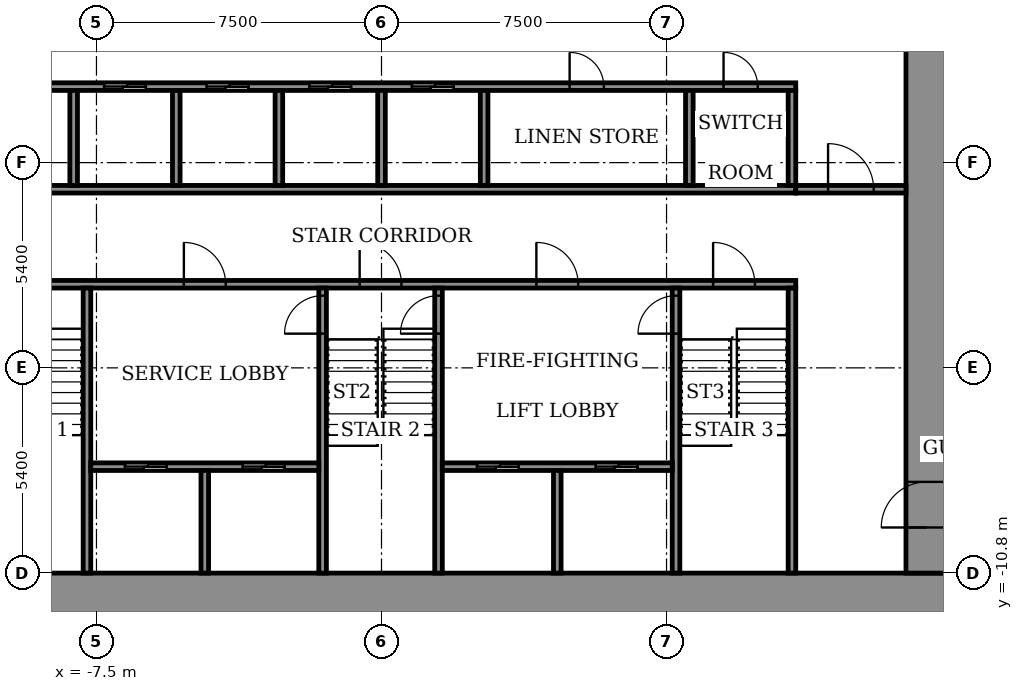
"""IFC4 building model, lengths in metres.
Left out: names, types, materials, properties, quantities, classifications, styles, units other than length and angle.
Written with IfcOpenShell. Run it as: python <this file> out.ifc"""

import sys

from ifc_helpers import new_model, si_unit, direction, frame, frame_2d, origin, place, context, subcontext, project, spatial, rectangle, extrude, element, fill, save


model = new_model("IFC4")
c1 = context("Model", 3, precision=1e-05, world=origin(), true_north=direction((0.0, 1.0)))
c2 = subcontext(c1, "Body", "Model", "MODEL_VIEW")
j1 = project(units=[si_unit("LENGTHUNIT", "METRE"), si_unit("PLANEANGLEUNIT", "RADIAN")], contexts=[c1])
p1 = place(None, origin())
s1 = spatial("IfcSite", under=j1, at=p1, CompositionType="ELEMENT")
p2 = place(p1, origin())
s2 = spatial("IfcBuilding", under=s1, at=p2, CompositionType="ELEMENT")
p3 = place(p2, frame((0.0, 0.0, 67.5)))
s3 = spatial("IfcBuildingStorey", under=s2, at=p3, CompositionType="ELEMENT", Elevation=67.5)
p4 = place(p3, frame((-14.9, -11.35, 0.0), z_axis=(0.0, 0.0, 1.0), x_axis=(1.0, 0.0, 0.0)))
e1 = element("IfcWall", 1, at=p4, inside=s3, PredefinedType="SHEAR", context=c2, shape_type="SweptSolid", body=[
    extrude(rectangle(XDim=29.8, YDim=1.1, at=frame_2d((14.9, 0.0))), origin(), (0.0, 0.0, 1.0), 3.6),
])
p5 = place(p3, frame((14.35, -10.8, 0.0), z_axis=(0.0, 0.0, 1.0), x_axis=(0.0, 1.0, 0.0)))
e2 = element("IfcWall", 2, at=p5, inside=s3, PredefinedType="SHEAR", context=c2, shape_type="SweptSolid", body=[
    extrude(rectangle(XDim=21.6, YDim=1.1, at=frame_2d((10.8, 0.0))), origin(), (0.0, 0.0, 1.0), 3.6),
])
p6 = place(p5, frame((1.2, 0.0, 0.0)))
e3 = element("IfcOpeningElement", 3, at=p6, cuts=e2, PredefinedType="OPENING", context=c2, shape_type="SweptSolid", body=[
    extrude(rectangle(XDim=1.2, YDim=2.1, at=frame_2d((0.6, 1.05))), frame((0.0, 0.56, 0.0), z_axis=(0.0, -1.0, 0.0), x_axis=(1.0, 0.0, 0.0)), (0.0, 0.0, 1.0), 1.12),
])
p7 = place(p3, frame((-10.9, -3.2, 0.0), z_axis=(0.0, 0.0, 1.0), x_axis=(1.0, 0.0, 0.0)))
e4 = element("IfcWall", 4, at=p7, inside=s3, PredefinedType="SHEAR", context=c2, shape_type="SweptSolid", body=[
    extrude(rectangle(XDim=21.8, YDim=0.2, at=frame_2d((10.9, 0.0))), origin(), (0.0, 0.0, 1.0), 3.05),
])
p8 = place(p7, frame((1.075, 0.0, 0.0)))
e5 = element("IfcOpeningElement", 5, at=p8, cuts=e4, PredefinedType="OPENING", context=c2, shape_type="SweptSolid", body=[
    extrude(rectangle(XDim=1.1, YDim=2.1, at=frame_2d((0.55, 1.05))), frame((0.0, 0.11, 0.0), z_axis=(0.0, -1.0, 0.0), x_axis=(1.0, 0.0, 0.0)), (0.0, 0.0, 1.0), 0.22),
])
p9 = place(p7, frame((10.325, 0.0, 0.0)))
e6 = element("IfcOpeningElement", 6, at=p9, cuts=e4, PredefinedType="OPENING", context=c2, shape_type="SweptSolid", body=[
    extrude(rectangle(XDim=1.1, YDim=2.1, at=frame_2d((0.55, 1.05))), frame((0.0, 0.11, 0.0), z_axis=(0.0, -1.0, 0.0), x_axis=(1.0, 0.0, 0.0)), (0.0, 0.0, 1.0), 0.22),
])
p10 = place(p7, frame((19.625, 0.0, 0.0)))
e7 = element("IfcOpeningElement", 7, at=p10, cuts=e4, PredefinedType="OPENING", context=c2, shape_type="SweptSolid", body=[
    extrude(rectangle(XDim=1.1, YDim=2.1, at=frame_2d((0.55, 1.05))), frame((0.0, 0.11, 0.0), z_axis=(0.0, -1.0, 0.0), x_axis=(1.0, 0.0, 0.0)), (0.0, 0.0, 1.0), 0.22),
])
p11 = place(p7, frame((5.7, 0.0, 0.0)))
e8 = element("IfcOpeningElement", 8, at=p11, cuts=e4, PredefinedType="OPENING", context=c2, shape_type="SweptSolid", body=[
    extrude(rectangle(XDim=1.1, YDim=2.1, at=frame_2d((0.55, 1.05))), frame((0.0, 0.11, 0.0), z_axis=(0.0, -1.0, 0.0), x_axis=(1.0, 0.0, 0.0)), (0.0, 0.0, 1.0), 0.22),
])
p12 = place(p7, frame((14.975, 0.0, 0.0)))
e9 = element("IfcOpeningElement", 9, at=p12, cuts=e4, PredefinedType="OPENING", context=c2, shape_type="SweptSolid", body=[
    extrude(rectangle(XDim=1.1, YDim=2.1, at=frame_2d((0.55, 1.05))), frame((0.0, 0.11, 0.0), z_axis=(0.0, -1.0, 0.0), x_axis=(1.0, 0.0, 0.0)), (0.0, 0.0, 1.0), 0.22),
])
p13 = place(p3, frame((-10.9, -0.7, 0.0), z_axis=(0.0, 0.0, 1.0), x_axis=(1.0, 0.0, 0.0)))
e10 = element("IfcWall", 10, at=p13, inside=s3, PredefinedType="SHEAR", context=c2, shape_type="SweptSolid", body=[
    extrude(rectangle(XDim=21.8, YDim=0.2, at=frame_2d((10.9, 0.0))), origin(), (0.0, 0.0, 1.0), 3.05),
])
p14 = place(p3, frame((-10.9, 2.0, 0.0), z_axis=(0.0, 0.0, 1.0), x_axis=(1.0, 0.0, 0.0)))
e11 = element("IfcWall", 11, at=p14, inside=s3, PredefinedType="SHEAR", context=c2, shape_type="SweptSolid", body=[
    extrude(rectangle(XDim=21.8, YDim=0.2, at=frame_2d((10.9, 0.0))), origin(), (0.0, 0.0, 1.0), 3.05),
])
p15 = place(p14, frame((0.9, 0.0, 0.0)))
e12 = element("IfcOpeningElement", 12, at=p15, cuts=e11, PredefinedType="OPENING", context=c2, shape_type="SweptSolid", body=[
    extrude(rectangle(XDim=1.1, YDim=2.1, at=frame_2d((0.55, 1.05))), frame((0.0, 0.11, 0.0), z_axis=(0.0, -1.0, 0.0), x_axis=(1.0, 0.0, 0.0)), (0.0, 0.0, 1.0), 0.22),
])
p16 = place(p14, frame((3.6, 0.0, 0.0)))
e13 = element("IfcOpeningElement", 13, at=p16, cuts=e11, PredefinedType="OPENING", context=c2, shape_type="SweptSolid", body=[
    extrude(rectangle(XDim=1.1, YDim=2.1, at=frame_2d((0.55, 1.05))), frame((0.0, 0.11, 0.0), z_axis=(0.0, -1.0, 0.0), x_axis=(1.0, 0.0, 0.0)), (0.0, 0.0, 1.0), 0.22),
])
p17 = place(p14, frame((6.3, 0.0, 0.0)))
e14 = element("IfcOpeningElement", 14, at=p17, cuts=e11, PredefinedType="OPENING", context=c2, shape_type="SweptSolid", body=[
    extrude(rectangle(XDim=1.1, YDim=2.1, at=frame_2d((0.55, 1.05))), frame((0.0, 0.11, 0.0), z_axis=(0.0, -1.0, 0.0), x_axis=(1.0, 0.0, 0.0)), (0.0, 0.0, 1.0), 0.22),
])
p18 = place(p14, frame((9.0, 0.0, 0.0)))
e15 = element("IfcOpeningElement", 15, at=p18, cuts=e11, PredefinedType="OPENING", context=c2, shape_type="SweptSolid", body=[
    extrude(rectangle(XDim=1.1, YDim=2.1, at=frame_2d((0.55, 1.05))), frame((0.0, 0.11, 0.0), z_axis=(0.0, -1.0, 0.0), x_axis=(1.0, 0.0, 0.0)), (0.0, 0.0, 1.0), 0.22),
])
p19 = place(p14, frame((11.7, 0.0, 0.0)))
e16 = element("IfcOpeningElement", 16, at=p19, cuts=e11, PredefinedType="OPENING", context=c2, shape_type="SweptSolid", body=[
    extrude(rectangle(XDim=1.1, YDim=2.1, at=frame_2d((0.55, 1.05))), frame((0.0, 0.11, 0.0), z_axis=(0.0, -1.0, 0.0), x_axis=(1.0, 0.0, 0.0)), (0.0, 0.0, 1.0), 0.22),
])
p20 = place(p14, frame((15.85, 0.0, 0.0)))
e17 = element("IfcOpeningElement", 17, at=p20, cuts=e11, PredefinedType="OPENING", context=c2, shape_type="SweptSolid", body=[
    extrude(rectangle(XDim=0.9, YDim=2.1, at=frame_2d((0.45, 1.05))), frame((0.0, 0.11, 0.0), z_axis=(0.0, -1.0, 0.0), x_axis=(1.0, 0.0, 0.0)), (0.0, 0.0, 1.0), 0.22),
])
p21 = place(p14, frame((19.9, 0.0, 0.0)))
e18 = element("IfcOpeningElement", 18, at=p21, cuts=e11, PredefinedType="OPENING", context=c2, shape_type="SweptSolid", body=[
    extrude(rectangle(XDim=0.9, YDim=2.1, at=frame_2d((0.45, 1.05))), frame((0.0, 0.11, 0.0), z_axis=(0.0, -1.0, 0.0), x_axis=(1.0, 0.0, 0.0)), (0.0, 0.0, 1.0), 0.22),
])
p22 = place(p3, frame((-7.75, -10.8, 0.0), z_axis=(0.0, 0.0, 1.0), x_axis=(0.0, 1.0, 0.0)))
e19 = element("IfcWall", 19, at=p22, inside=s3, PredefinedType="SHEAR", context=c2, shape_type="SweptSolid", body=[
    extrude(rectangle(XDim=7.5, YDim=0.2, at=frame_2d((3.75, 0.0))), origin(), (0.0, 0.0, 1.0), 3.05),
])
p23 = place(p3, frame((-1.55, -10.8, 0.0), z_axis=(0.0, 0.0, 1.0), x_axis=(0.0, 1.0, 0.0)))
e20 = element("IfcWall", 20, at=p23, inside=s3, PredefinedType="SHEAR", context=c2, shape_type="SweptSolid", body=[
    extrude(rectangle(XDim=7.5, YDim=0.2, at=frame_2d((3.75, 0.0))), origin(), (0.0, 0.0, 1.0), 3.05),
])
p24 = place(p23, frame((6.3, 0.0, 0.0)))
e21 = element("IfcOpeningElement", 21, at=p24, cuts=e20, PredefinedType="OPENING", context=c2, shape_type="SweptSolid", body=[
    extrude(rectangle(XDim=1.0, YDim=2.1, at=frame_2d((0.5, 1.05))), frame((0.0, 0.11, 0.0), z_axis=(0.0, -1.0, 0.0), x_axis=(1.0, 0.0, 0.0)), (0.0, 0.0, 1.0), 0.22),
])
p25 = place(p3, frame((1.5, -10.8, 0.0), z_axis=(0.0, 0.0, 1.0), x_axis=(0.0, 1.0, 0.0)))
e22 = element("IfcWall", 22, at=p25, inside=s3, PredefinedType="SHEAR", context=c2, shape_type="SweptSolid", body=[
    extrude(rectangle(XDim=7.5, YDim=0.2, at=frame_2d((3.75, 0.0))), origin(), (0.0, 0.0, 1.0), 3.05),
])
p26 = place(p25, frame((6.3, 0.0, 0.0)))
e23 = element("IfcOpeningElement", 23, at=p26, cuts=e22, PredefinedType="OPENING", context=c2, shape_type="SweptSolid", body=[
    extrude(rectangle(XDim=1.0, YDim=2.1, at=frame_2d((0.5, 1.05))), frame((0.0, 0.11, 0.0), z_axis=(0.0, -1.0, 0.0), x_axis=(1.0, 0.0, 0.0)), (0.0, 0.0, 1.0), 0.22),
])
p27 = place(p3, frame((7.75, -10.8, 0.0), z_axis=(0.0, 0.0, 1.0), x_axis=(0.0, 1.0, 0.0)))
e24 = element("IfcWall", 24, at=p27, inside=s3, PredefinedType="SHEAR", context=c2, shape_type="SweptSolid", body=[
    extrude(rectangle(XDim=7.5, YDim=0.2, at=frame_2d((3.75, 0.0))), origin(), (0.0, 0.0, 1.0), 3.05),
])
p28 = place(p27, frame((6.3, 0.0, 0.0)))
e25 = element("IfcOpeningElement", 25, at=p28, cuts=e24, PredefinedType="OPENING", context=c2, shape_type="SweptSolid", body=[
    extrude(rectangle(XDim=1.0, YDim=2.1, at=frame_2d((0.5, 1.05))), frame((0.0, 0.11, 0.0), z_axis=(0.0, -1.0, 0.0), x_axis=(1.0, 0.0, 0.0)), (0.0, 0.0, 1.0), 0.22),
])
p29 = place(p3, frame((10.8, -10.8, 0.0), z_axis=(0.0, 0.0, 1.0), x_axis=(0.0, 1.0, 0.0)))
e26 = element("IfcWall", 26, at=p29, inside=s3, PredefinedType="SHEAR", context=c2, shape_type="SweptSolid", body=[
    extrude(rectangle(XDim=7.5, YDim=0.2, at=frame_2d((3.75, 0.0))), origin(), (0.0, 0.0, 1.0), 3.05),
])
p30 = place(p3, frame((-7.65, -8.0, 0.0), z_axis=(0.0, 0.0, 1.0), x_axis=(1.0, 0.0, 0.0)))
e27 = element("IfcWall", 27, at=p30, inside=s3, PredefinedType="SHEAR", context=c2, shape_type="SweptSolid", body=[
    extrude(rectangle(XDim=6.0, YDim=0.2, at=frame_2d((3.0, 0.0))), origin(), (0.0, 0.0, 1.0), 3.05),
])
p31 = place(p30, frame((0.9, 0.0, 0.0)))
e28 = element("IfcOpeningElement", 28, at=p31, cuts=e27, PredefinedType="OPENING", context=c2, shape_type="SweptSolid", body=[
    extrude(rectangle(XDim=1.1, YDim=2.1, at=frame_2d((0.55, 1.05))), frame((0.0, 0.11, 0.0), z_axis=(0.0, -1.0, 0.0), x_axis=(1.0, 0.0, 0.0)), (0.0, 0.0, 1.0), 0.22),
])
p32 = place(p30, frame((4.0, 0.0, 0.0)))
e29 = element("IfcOpeningElement", 29, at=p32, cuts=e27, PredefinedType="OPENING", context=c2, shape_type="SweptSolid", body=[
    extrude(rectangle(XDim=1.1, YDim=2.1, at=frame_2d((0.55, 1.05))), frame((0.0, 0.11, 0.0), z_axis=(0.0, -1.0, 0.0), x_axis=(1.0, 0.0, 0.0)), (0.0, 0.0, 1.0), 0.22),
])
p33 = place(p3, frame((-4.65, -10.8, 0.0), z_axis=(0.0, 0.0, 1.0), x_axis=(0.0, 1.0, 0.0)))
e30 = element("IfcWall", 30, at=p33, inside=s3, PredefinedType="SHEAR", context=c2, shape_type="SweptSolid", body=[
    extrude(rectangle(XDim=2.7, YDim=0.2, at=frame_2d((1.35, 0.0))), origin(), (0.0, 0.0, 1.0), 3.05),
])
p34 = place(p3, frame((1.6, -8.0, 0.0), z_axis=(0.0, 0.0, 1.0), x_axis=(1.0, 0.0, 0.0)))
e31 = element("IfcWall", 31, at=p34, inside=s3, PredefinedType="SHEAR", context=c2, shape_type="SweptSolid", body=[
    extrude(rectangle(XDim=6.05, YDim=0.2, at=frame_2d((3.025, 0.0))), origin(), (0.0, 0.0, 1.0), 3.05),
])
p35 = place(p34, frame((0.913, 0.0, 0.0)))
e32 = element("IfcOpeningElement", 32, at=p35, cuts=e31, PredefinedType="OPENING", context=c2, shape_type="SweptSolid", body=[
    extrude(rectangle(XDim=1.1, YDim=2.1, at=frame_2d((0.55, 1.05))), frame((0.0, 0.11, 0.0), z_axis=(0.0, -1.0, 0.0), x_axis=(1.0, 0.0, 0.0)), (0.0, 0.0, 1.0), 0.22),
])
p36 = place(p34, frame((4.038, 0.0, 0.0)))
e33 = element("IfcOpeningElement", 33, at=p36, cuts=e31, PredefinedType="OPENING", context=c2, shape_type="SweptSolid", body=[
    extrude(rectangle(XDim=1.1, YDim=2.1, at=frame_2d((0.55, 1.05))), frame((0.0, 0.11, 0.0), z_axis=(0.0, -1.0, 0.0), x_axis=(1.0, 0.0, 0.0)), (0.0, 0.0, 1.0), 0.22),
])
p37 = place(p3, frame((4.625, -10.8, 0.0), z_axis=(0.0, 0.0, 1.0), x_axis=(0.0, 1.0, 0.0)))
e34 = element("IfcWall", 34, at=p37, inside=s3, PredefinedType="SHEAR", context=c2, shape_type="SweptSolid", body=[
    extrude(rectangle(XDim=2.7, YDim=0.2, at=frame_2d((1.35, 0.0))), origin(), (0.0, 0.0, 1.0), 3.05),
])
for number, where, z_axis, x_axis in (
    (35, (-8.1, -0.6, 0.0), (0.0, 0.0, 1.0), (0.0, 1.0, 0.0)),
    (36, (-5.4, -0.6, 0.0), (0.0, 0.0, 1.0), (0.0, 1.0, 0.0)),
    (37, (-2.7, -0.6, 0.0), (0.0, 0.0, 1.0), (0.0, 1.0, 0.0)),
    (38, (0.0, -0.6, 0.0), (0.0, 0.0, 1.0), (0.0, 1.0, 0.0)),
    (39, (2.7, -0.6, 0.0), (0.0, 0.0, 1.0), (0.0, 1.0, 0.0)),
):
    element("IfcWall", number, at=place(p3, frame(where, z_axis=z_axis, x_axis=x_axis)), inside=s3, PredefinedType="SHEAR", context=c2, shape_type="SweptSolid", body=[
        extrude(rectangle(XDim=2.5, YDim=0.2, at=frame_2d((1.25, 0.0))), origin(), (0.0, 0.0, 1.0), 3.05),
    ])
for number, where, z_axis, x_axis in (
    (40, (8.1, -0.6, 0.0), (0.0, 0.0, 1.0), (0.0, 1.0, 0.0)),
    (41, (10.8, -0.6, 0.0), (0.0, 0.0, 1.0), (0.0, 1.0, 0.0)),
):
    element("IfcWall", number, at=place(p3, frame(where, z_axis=z_axis, x_axis=x_axis)), inside=s3, PredefinedType="STANDARD", context=c2, shape_type="SweptSolid", body=[
        extrude(rectangle(XDim=2.5, YDim=0.2, at=frame_2d((1.25, 0.0))), origin(), (0.0, 0.0, 1.0), 3.05),
    ])
p38 = place(p3, frame((10.9, -0.7, 0.0), z_axis=(0.0, 0.0, 1.0), x_axis=(1.0, 0.0, 0.0)))
e42 = element("IfcWall", 42, at=p38, inside=s3, PredefinedType="STANDARD", context=c2, shape_type="SweptSolid", body=[
    extrude(rectangle(XDim=2.9, YDim=0.2, at=frame_2d((1.45, 0.0))), origin(), (0.0, 0.0, 1.0), 3.05),
])
p39 = place(p38, frame((0.85, 0.0, 0.0)))
e43 = element("IfcOpeningElement", 43, at=p39, cuts=e42, PredefinedType="OPENING", context=c2, shape_type="SweptSolid", body=[
    extrude(rectangle(XDim=1.2, YDim=2.1, at=frame_2d((0.6, 1.05))), frame((0.0, 0.11, 0.0), z_axis=(0.0, -1.0, 0.0), x_axis=(1.0, 0.0, 0.0)), (0.0, 0.0, 1.0), 0.22),
])
p40 = place(p6, origin())
e44 = element("IfcDoor", 44, at=p40, inside=s3, OperationType="DOUBLE_DOOR_SINGLE_SWING", PredefinedType="DOOR", context=c2, shape_type="SweptSolid", body=[
    extrude(rectangle(XDim=1.2, YDim=2.1, at=frame_2d((0.6, 1.05))), frame((0.0, 0.025, 0.0), z_axis=(0.0, -1.0, 0.0), x_axis=(1.0, 0.0, 0.0)), (0.0, 0.0, 1.0), 0.05),
])
fill(e3, e44)
p41 = place(p16, origin())
e45 = element("IfcDoor", 45, at=p41, inside=s3, OperationType="SLIDING_TO_LEFT", PredefinedType="DOOR", context=c2, shape_type="SweptSolid", body=[
    extrude(rectangle(XDim=1.1, YDim=2.1, at=frame_2d((0.55, 1.05))), frame((0.0, 0.025, 0.0), z_axis=(0.0, -1.0, 0.0), x_axis=(1.0, 0.0, 0.0)), (0.0, 0.0, 1.0), 0.05),
])
fill(e13, e45)
p42 = place(p17, origin())
e46 = element("IfcDoor", 46, at=p42, inside=s3, OperationType="SLIDING_TO_LEFT", PredefinedType="DOOR", context=c2, shape_type="SweptSolid", body=[
    extrude(rectangle(XDim=1.1, YDim=2.1, at=frame_2d((0.55, 1.05))), frame((0.0, 0.025, 0.0), z_axis=(0.0, -1.0, 0.0), x_axis=(1.0, 0.0, 0.0)), (0.0, 0.0, 1.0), 0.05),
])
fill(e14, e46)
p43 = place(p18, origin())
e47 = element("IfcDoor", 47, at=p43, inside=s3, OperationType="SLIDING_TO_LEFT", PredefinedType="DOOR", context=c2, shape_type="SweptSolid", body=[
    extrude(rectangle(XDim=1.1, YDim=2.1, at=frame_2d((0.55, 1.05))), frame((0.0, 0.025, 0.0), z_axis=(0.0, -1.0, 0.0), x_axis=(1.0, 0.0, 0.0)), (0.0, 0.0, 1.0), 0.05),
])
fill(e15, e47)
p44 = place(p19, origin())
e48 = element("IfcDoor", 48, at=p44, inside=s3, OperationType="SLIDING_TO_LEFT", PredefinedType="DOOR", context=c2, shape_type="SweptSolid", body=[
    extrude(rectangle(XDim=1.1, YDim=2.1, at=frame_2d((0.55, 1.05))), frame((0.0, 0.025, 0.0), z_axis=(0.0, -1.0, 0.0), x_axis=(1.0, 0.0, 0.0)), (0.0, 0.0, 1.0), 0.05),
])
fill(e16, e48)
p45 = place(p20, origin())
e49 = element("IfcDoor", 49, at=p45, inside=s3, OperationType="SINGLE_SWING_RIGHT", PredefinedType="DOOR", context=c2, shape_type="SweptSolid", body=[
    extrude(rectangle(XDim=0.9, YDim=2.1, at=frame_2d((0.45, 1.05))), frame((0.0, 0.025, 0.0), z_axis=(0.0, -1.0, 0.0), x_axis=(1.0, 0.0, 0.0)), (0.0, 0.0, 1.0), 0.05),
])
fill(e17, e49)
p46 = place(p21, origin())
e50 = element("IfcDoor", 50, at=p46, inside=s3, OperationType="SINGLE_SWING_LEFT", PredefinedType="DOOR", context=c2, shape_type="SweptSolid", body=[
    extrude(rectangle(XDim=0.9, YDim=2.1, at=frame_2d((0.45, 1.05))), frame((0.0, 0.025, 0.0), z_axis=(0.0, -1.0, 0.0), x_axis=(1.0, 0.0, 0.0)), (0.0, 0.0, 1.0), 0.05),
])
fill(e18, e50)
p47 = place(p35, origin())
e51 = element("IfcDoor", 51, at=p47, inside=s3, OperationType="SLIDING_TO_LEFT", PredefinedType="DOOR", context=c2, shape_type="SweptSolid", body=[
    extrude(rectangle(XDim=1.1, YDim=2.1, at=frame_2d((0.55, 1.05))), frame((0.0, 0.025, 0.0), z_axis=(0.0, -1.0, 0.0), x_axis=(1.0, 0.0, 0.0)), (0.0, 0.0, 1.0), 0.05),
])
fill(e32, e51)
p48 = place(p31, origin())
e52 = element("IfcDoor", 52, at=p48, inside=s3, OperationType="SLIDING_TO_LEFT", PredefinedType="DOOR", context=c2, shape_type="SweptSolid", body=[
    extrude(rectangle(XDim=1.1, YDim=2.1, at=frame_2d((0.55, 1.05))), frame((0.0, 0.025, 0.0), z_axis=(0.0, -1.0, 0.0), x_axis=(1.0, 0.0, 0.0)), (0.0, 0.0, 1.0), 0.05),
])
fill(e28, e52)
p49 = place(p36, origin())
e53 = element("IfcDoor", 53, at=p49, inside=s3, OperationType="SLIDING_TO_LEFT", PredefinedType="DOOR", context=c2, shape_type="SweptSolid", body=[
    extrude(rectangle(XDim=1.1, YDim=2.1, at=frame_2d((0.55, 1.05))), frame((0.0, 0.025, 0.0), z_axis=(0.0, -1.0, 0.0), x_axis=(1.0, 0.0, 0.0)), (0.0, 0.0, 1.0), 0.05),
])
fill(e33, e53)
p50 = place(p32, origin())
e54 = element("IfcDoor", 54, at=p50, inside=s3, OperationType="SLIDING_TO_LEFT", PredefinedType="DOOR", context=c2, shape_type="SweptSolid", body=[
    extrude(rectangle(XDim=1.1, YDim=2.1, at=frame_2d((0.55, 1.05))), frame((0.0, 0.025, 0.0), z_axis=(0.0, -1.0, 0.0), x_axis=(1.0, 0.0, 0.0)), (0.0, 0.0, 1.0), 0.05),
])
fill(e29, e54)
p51 = place(p9, origin())
e55 = element("IfcDoor", 55, at=p51, inside=s3, OperationType="SINGLE_SWING_RIGHT", PredefinedType="DOOR", context=c2, shape_type="SweptSolid", body=[
    extrude(rectangle(XDim=1.1, YDim=2.1, at=frame_2d((0.55, 1.05))), frame((0.0, 0.025, 0.0), z_axis=(0.0, -1.0, 0.0), x_axis=(1.0, 0.0, 0.0)), (0.0, 0.0, 1.0), 0.05),
])
fill(e6, e55)
p52 = place(p10, origin())
e56 = element("IfcDoor", 56, at=p52, inside=s3, OperationType="SINGLE_SWING_RIGHT", PredefinedType="DOOR", context=c2, shape_type="SweptSolid", body=[
    extrude(rectangle(XDim=1.1, YDim=2.1, at=frame_2d((0.55, 1.05))), frame((0.0, 0.025, 0.0), z_axis=(0.0, -1.0, 0.0), x_axis=(1.0, 0.0, 0.0)), (0.0, 0.0, 1.0), 0.05),
])
fill(e7, e56)
p53 = place(p11, origin())
e57 = element("IfcDoor", 57, at=p53, inside=s3, OperationType="SINGLE_SWING_LEFT", PredefinedType="DOOR", context=c2, shape_type="SweptSolid", body=[
    extrude(rectangle(XDim=1.1, YDim=2.1, at=frame_2d((0.55, 1.05))), frame((0.0, 0.025, 0.0), z_axis=(0.0, -1.0, 0.0), x_axis=(1.0, 0.0, 0.0)), (0.0, 0.0, 1.0), 0.05),
])
fill(e8, e57)
p54 = place(p12, origin())
e58 = element("IfcDoor", 58, at=p54, inside=s3, OperationType="SINGLE_SWING_LEFT", PredefinedType="DOOR", context=c2, shape_type="SweptSolid", body=[
    extrude(rectangle(XDim=1.1, YDim=2.1, at=frame_2d((0.55, 1.05))), frame((0.0, 0.025, 0.0), z_axis=(0.0, -1.0, 0.0), x_axis=(1.0, 0.0, 0.0)), (0.0, 0.0, 1.0), 0.05),
])
fill(e9, e58)
p55 = place(p24, origin())
e59 = element("IfcDoor", 59, at=p55, inside=s3, OperationType="SINGLE_SWING_RIGHT", PredefinedType="DOOR", context=c2, shape_type="SweptSolid", body=[
    extrude(rectangle(XDim=1.0, YDim=2.1, at=frame_2d((0.5, 1.05))), frame((0.0, 0.025, 0.0), z_axis=(0.0, -1.0, 0.0), x_axis=(1.0, 0.0, 0.0)), (0.0, 0.0, 1.0), 0.05),
])
fill(e21, e59)
p56 = place(p26, origin())
e60 = element("IfcDoor", 60, at=p56, inside=s3, OperationType="SINGLE_SWING_RIGHT", PredefinedType="DOOR", context=c2, shape_type="SweptSolid", body=[
    extrude(rectangle(XDim=1.0, YDim=2.1, at=frame_2d((0.5, 1.05))), frame((0.0, 0.025, 0.0), z_axis=(0.0, -1.0, 0.0), x_axis=(1.0, 0.0, 0.0)), (0.0, 0.0, 1.0), 0.05),
])
fill(e23, e60)
p57 = place(p28, origin())
e61 = element("IfcDoor", 61, at=p57, inside=s3, OperationType="SINGLE_SWING_RIGHT", PredefinedType="DOOR", context=c2, shape_type="SweptSolid", body=[
    extrude(rectangle(XDim=1.0, YDim=2.1, at=frame_2d((0.5, 1.05))), frame((0.0, 0.025, 0.0), z_axis=(0.0, -1.0, 0.0), x_axis=(1.0, 0.0, 0.0)), (0.0, 0.0, 1.0), 0.05),
])
fill(e25, e61)
p58 = place(p39, origin())
e62 = element("IfcDoor", 62, at=p58, inside=s3, OperationType="SINGLE_SWING_LEFT", PredefinedType="DOOR", context=c2, shape_type="SweptSolid", body=[
    extrude(rectangle(XDim=1.2, YDim=2.1, at=frame_2d((0.6, 1.05))), frame((0.0, 0.025, 0.0), z_axis=(0.0, -1.0, 0.0), x_axis=(1.0, 0.0, 0.0)), (0.0, 0.0, 1.0), 0.05),
])
fill(e43, e62)
save(model, sys.argv[1])
